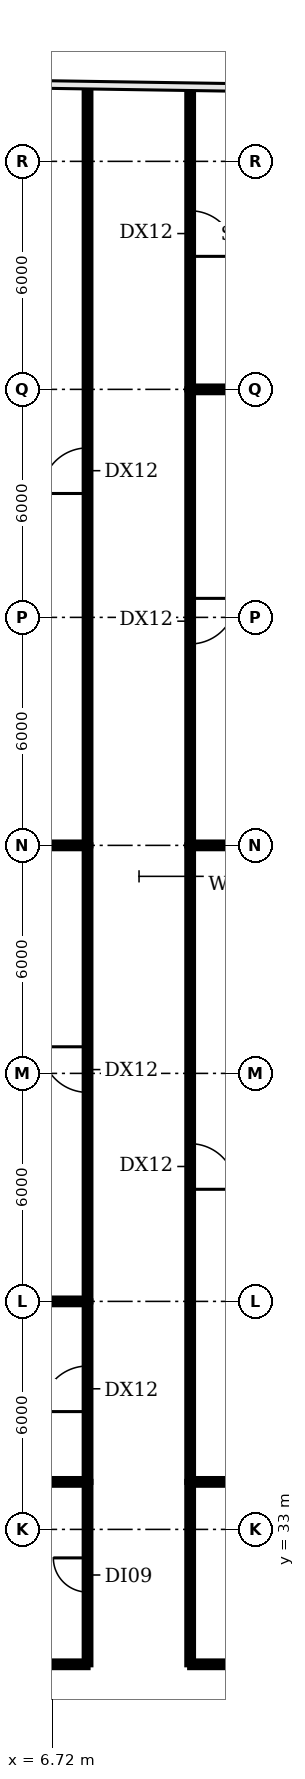
"""IFC4 building model, lengths in metres.
Left out: names, types, materials, properties, quantities, classifications, styles, units other than length and angle.
Written with IfcOpenShell. Run it as: python <this file> out.ifc"""

import sys

from ifc_helpers import new_model, si_unit, direction, frame, frame_2d, origin, place, context, subcontext, project, spatial, rectangle, extrude, element, fill, save


model = new_model("IFC4")
c1 = context("Model", 3, precision=1e-05, world=origin(), true_north=direction((0.0, 1.0)))
c2 = subcontext(c1, "Body", "Model", "MODEL_VIEW")
j1 = project(units=[si_unit("LENGTHUNIT", "METRE"), si_unit("PLANEANGLEUNIT", "RADIAN")], contexts=[c1])
p1 = place(None, origin())
s1 = spatial("IfcSite", under=j1, at=p1, CompositionType="ELEMENT")
p2 = place(p1, origin())
s2 = spatial("IfcBuilding", under=s1, at=p2, CompositionType="ELEMENT")
p3 = place(p2, frame((0.0, 0.0, 134.0)))
s3 = spatial("IfcBuildingStorey", under=s2, at=p3, CompositionType="ELEMENT", Elevation=134.0)
p4 = place(p3, frame((-0.981, 34.25, 0.0), z_axis=(0.0, 0.0, 1.0), x_axis=(1.0, 0.0, 0.0)))
e1 = element("IfcWall", 1, at=p4, inside=s3, PredefinedType="PARTITIONING", context=c2, shape_type="SweptSolid", body=[
    extrude(rectangle(XDim=8.631, YDim=0.15, at=frame_2d((4.315, 0.0))), origin(), (0.0, 0.0, 1.0), 2.78),
])
for number, where, z_axis, x_axis in (
    (2, (-1.04, 39.0, 0.0), (0.0, 0.0, 1.0), (1.0, 0.0, 0.0)),
    (3, (-1.04, 51.0, 0.0), (0.0, 0.0, 1.0), (1.0, 0.0, 0.0)),
):
    element("IfcWall", number, at=place(p3, frame(where, z_axis=z_axis, x_axis=x_axis)), inside=s3, PredefinedType="PARTITIONING", context=c2, shape_type="SweptSolid", body=[
        extrude(rectangle(XDim=8.69, YDim=0.15, at=frame_2d((4.345, 0.0))), origin(), (0.0, 0.0, 1.0), 2.78),
    ])
p5 = place(p3, frame((2.55, 29.45, 0.0), z_axis=(0.0, 0.0, 1.0), x_axis=(1.0, 0.0, 0.0)))
e4 = element("IfcWall", 4, at=p5, inside=s3, PredefinedType="PARTITIONING", context=c2, shape_type="SweptSolid", body=[
    extrude(rectangle(XDim=5.1, YDim=0.15, at=frame_2d((2.55, 0.0))), origin(), (0.0, 0.0, 1.0), 2.78),
])
p6 = place(p3, frame((7.65, 29.45, 0.0), z_axis=(0.0, 0.0, 1.0), x_axis=(0.0, 1.0, 0.0)))
e5 = element("IfcWall", 5, at=p6, inside=s3, PredefinedType="PARTITIONING", context=c2, shape_type="SweptSolid", body=[
    extrude(rectangle(XDim=4.8, YDim=0.15, at=frame_2d((2.4, 0.0))), origin(), (0.0, 0.0, 1.0), 2.78),
])
p7 = place(p6, frame((1.9, 0.0, 0.0)))
e6 = element("IfcOpeningElement", 6, at=p7, cuts=e5, PredefinedType="OPENING", context=c2, shape_type="SweptSolid", body=[
    extrude(rectangle(XDim=0.9, YDim=2.1, at=frame_2d((0.45, 1.05))), frame((0.0, 0.085, 0.0), z_axis=(0.0, -1.0, 0.0), x_axis=(1.0, 0.0, 0.0)), (0.0, 0.0, 1.0), 0.17),
])
p8 = place(p3, frame((7.65, 34.25, 0.0), z_axis=(0.0, 0.0, 1.0), x_axis=(0.0, 1.0, 0.0)))
e7 = element("IfcWall", 7, at=p8, inside=s3, PredefinedType="PARTITIONING", context=c2, shape_type="SweptSolid", body=[
    extrude(rectangle(XDim=4.75, YDim=0.15, at=frame_2d((2.375, 0.0))), origin(), (0.0, 0.0, 1.0), 2.78),
])
p9 = place(p8, frame((1.85, 0.0, 0.0)))
e8 = element("IfcOpeningElement", 8, at=p9, cuts=e7, PredefinedType="OPENING", context=c2, shape_type="SweptSolid", body=[
    extrude(rectangle(XDim=1.2, YDim=2.1, at=frame_2d((0.6, 1.05))), frame((0.0, 0.085, 0.0), z_axis=(0.0, -1.0, 0.0), x_axis=(1.0, 0.0, 0.0)), (0.0, 0.0, 1.0), 0.17),
])
p10 = place(p3, frame((7.65, 39.0, 0.0), z_axis=(0.0, 0.0, 1.0), x_axis=(0.0, 1.0, 0.0)))
e9 = element("IfcWall", 9, at=p10, inside=s3, PredefinedType="PARTITIONING", context=c2, shape_type="SweptSolid", body=[
    extrude(rectangle(XDim=12.0, YDim=0.15, at=frame_2d((6.0, 0.0))), origin(), (0.0, 0.0, 1.0), 2.78),
])
p11 = place(p10, frame((5.5, 0.0, 0.0)))
e10 = element("IfcOpeningElement", 10, at=p11, cuts=e9, PredefinedType="OPENING", context=c2, shape_type="SweptSolid", body=[
    extrude(rectangle(XDim=1.2, YDim=2.1, at=frame_2d((0.6, 1.05))), frame((0.0, 0.085, 0.0), z_axis=(0.0, -1.0, 0.0), x_axis=(1.0, 0.0, 0.0)), (0.0, 0.0, 1.0), 0.17),
])
p12 = place(p3, frame((7.65, 51.0, 0.0), z_axis=(0.0, 0.0, 1.0), x_axis=(0.0, 1.0, 0.0)))
e11 = element("IfcWall", 11, at=p12, inside=s3, PredefinedType="PARTITIONING", context=c2, shape_type="SweptSolid", body=[
    extrude(rectangle(XDim=19.96, YDim=0.15, at=frame_2d((9.98, 0.0))), origin(), (0.0, 0.0, 1.0), 2.78),
])
p13 = place(p12, frame((9.26, 0.0, 0.0)))
e12 = element("IfcOpeningElement", 12, at=p13, cuts=e11, PredefinedType="OPENING", context=c2, shape_type="SweptSolid", body=[
    extrude(rectangle(XDim=1.2, YDim=2.1, at=frame_2d((0.6, 1.05))), frame((0.0, 0.085, 0.0), z_axis=(0.0, -1.0, 0.0), x_axis=(1.0, 0.0, 0.0)), (0.0, 0.0, 1.0), 0.17),
])
p14 = place(p3, frame((10.35, 29.45, 0.0), z_axis=(0.0, 0.0, 1.0), x_axis=(0.0, 1.0, 0.0)))
e13 = element("IfcWall", 13, at=p14, inside=s3, PredefinedType="PARTITIONING", context=c2, shape_type="SweptSolid", body=[
    extrude(rectangle(XDim=4.8, YDim=0.15, at=frame_2d((2.4, 0.0))), origin(), (0.0, 0.0, 1.0), 2.78),
])
p15 = place(p3, frame((10.35, 29.45, 0.0), z_axis=(0.0, 0.0, 1.0), x_axis=(1.0, 0.0, 0.0)))
e14 = element("IfcWall", 14, at=p15, inside=s3, PredefinedType="PARTITIONING", context=c2, shape_type="SweptSolid", body=[
    extrude(rectangle(XDim=4.05, YDim=0.15, at=frame_2d((2.025, 0.0))), origin(), (0.0, 0.0, 1.0), 2.78),
])
p16 = place(p3, frame((10.35, 34.25, 0.0), z_axis=(0.0, 0.0, 1.0), x_axis=(1.0, 0.0, 0.0)))
e15 = element("IfcWall", 15, at=p16, inside=s3, PredefinedType="PARTITIONING", context=c2, shape_type="SweptSolid", body=[
    extrude(rectangle(XDim=14.756, YDim=0.15, at=frame_2d((7.378, 0.0))), origin(), (0.0, 0.0, 1.0), 2.78),
])
p17 = place(p3, frame((10.35, 51.0, 0.0), z_axis=(0.0, 0.0, 1.0), x_axis=(0.0, -1.0, 0.0)))
e16 = element("IfcWall", 16, at=p17, inside=s3, PredefinedType="PARTITIONING", context=c2, shape_type="SweptSolid", body=[
    extrude(rectangle(XDim=16.75, YDim=0.15, at=frame_2d((8.375, 0.0))), origin(), (0.0, 0.0, 1.0), 2.78),
])
p18 = place(p17, frame((7.85, 0.0, 0.0)))
e17 = element("IfcOpeningElement", 17, at=p18, cuts=e16, PredefinedType="OPENING", context=c2, shape_type="SweptSolid", body=[
    extrude(rectangle(XDim=1.2, YDim=2.1, at=frame_2d((0.6, 1.05))), frame((0.0, 0.085, 0.0), z_axis=(0.0, -1.0, 0.0), x_axis=(1.0, 0.0, 0.0)), (0.0, 0.0, 1.0), 0.17),
])
p19 = place(p3, frame((10.35, 51.0, 0.0), z_axis=(0.0, 0.0, 1.0), x_axis=(1.0, 0.0, 0.0)))
e18 = element("IfcWall", 18, at=p19, inside=s3, PredefinedType="PARTITIONING", context=c2, shape_type="SweptSolid", body=[
    extrude(rectangle(XDim=16.41, YDim=0.15, at=frame_2d((8.205, 0.0))), origin(), (0.0, 0.0, 1.0), 2.78),
])
p20 = place(p3, frame((10.35, 63.0, 0.0), z_axis=(0.0, 0.0, 1.0), x_axis=(0.0, -1.0, 0.0)))
e19 = element("IfcWall", 19, at=p20, inside=s3, PredefinedType="PARTITIONING", context=c2, shape_type="SweptSolid", body=[
    extrude(rectangle(XDim=12.0, YDim=0.15, at=frame_2d((6.0, 0.0))), origin(), (0.0, 0.0, 1.0), 2.78),
])
p21 = place(p20, frame((5.5, 0.0, 0.0)))
e20 = element("IfcOpeningElement", 20, at=p21, cuts=e19, PredefinedType="OPENING", context=c2, shape_type="SweptSolid", body=[
    extrude(rectangle(XDim=1.2, YDim=2.1, at=frame_2d((0.6, 1.05))), frame((0.0, 0.085, 0.0), z_axis=(0.0, -1.0, 0.0), x_axis=(1.0, 0.0, 0.0)), (0.0, 0.0, 1.0), 0.17),
])
p22 = place(p3, frame((10.35, 63.0, 0.0), z_axis=(0.0, 0.0, 1.0), x_axis=(1.0, 0.0, 0.0)))
e21 = element("IfcWall", 21, at=p22, inside=s3, PredefinedType="PARTITIONING", context=c2, shape_type="SweptSolid", body=[
    extrude(rectangle(XDim=17.1, YDim=0.15, at=frame_2d((8.55, 0.0))), origin(), (0.0, 0.0, 1.0), 2.78),
])
p23 = place(p3, frame((10.35, 70.91, 0.0), z_axis=(0.0, 0.0, 1.0), x_axis=(0.0, -1.0, 0.0)))
e22 = element("IfcWall", 22, at=p23, inside=s3, PredefinedType="PARTITIONING", context=c2, shape_type="SweptSolid", body=[
    extrude(rectangle(XDim=7.91, YDim=0.15, at=frame_2d((3.955, 0.0))), origin(), (0.0, 0.0, 1.0), 2.78),
])
p24 = place(p23, frame((3.21, 0.0, 0.0)))
e23 = element("IfcOpeningElement", 23, at=p24, cuts=e22, PredefinedType="OPENING", context=c2, shape_type="SweptSolid", body=[
    extrude(rectangle(XDim=1.2, YDim=2.1, at=frame_2d((0.6, 1.05))), frame((0.0, 0.085, 0.0), z_axis=(0.0, -1.0, 0.0), x_axis=(1.0, 0.0, 0.0)), (0.0, 0.0, 1.0), 0.17),
])
p25 = place(p7, origin())
e24 = element("IfcDoor", 24, at=p25, inside=s3, OperationType="SINGLE_SWING_RIGHT", PredefinedType="DOOR", context=c2, shape_type="SweptSolid", body=[
    extrude(rectangle(XDim=0.9, YDim=2.1, at=frame_2d((0.45, 1.05))), frame((0.0, 0.025, 0.0), z_axis=(0.0, -1.0, 0.0), x_axis=(1.0, 0.0, 0.0)), (0.0, 0.0, 1.0), 0.05),
])
fill(e6, e24)
p26 = place(p9, origin())
e25 = element("IfcDoor", 25, at=p26, inside=s3, OperationType="SINGLE_SWING_LEFT", PredefinedType="DOOR", context=c2, shape_type="SweptSolid", body=[
    extrude(rectangle(XDim=1.2, YDim=2.1, at=frame_2d((0.6, 1.05))), frame((0.0, 0.025, 0.0), z_axis=(0.0, -1.0, 0.0), x_axis=(1.0, 0.0, 0.0)), (0.0, 0.0, 1.0), 0.05),
])
fill(e8, e25)
p27 = place(p11, origin())
e26 = element("IfcDoor", 26, at=p27, inside=s3, OperationType="SINGLE_SWING_RIGHT", PredefinedType="DOOR", context=c2, shape_type="SweptSolid", body=[
    extrude(rectangle(XDim=1.2, YDim=2.1, at=frame_2d((0.6, 1.05))), frame((0.0, 0.025, 0.0), z_axis=(0.0, -1.0, 0.0), x_axis=(1.0, 0.0, 0.0)), (0.0, 0.0, 1.0), 0.05),
])
fill(e10, e26)
p28 = place(p13, origin())
e27 = element("IfcDoor", 27, at=p28, inside=s3, OperationType="SINGLE_SWING_LEFT", PredefinedType="DOOR", context=c2, shape_type="SweptSolid", body=[
    extrude(rectangle(XDim=1.2, YDim=2.1, at=frame_2d((0.6, 1.05))), frame((0.0, 0.025, 0.0), z_axis=(0.0, -1.0, 0.0), x_axis=(1.0, 0.0, 0.0)), (0.0, 0.0, 1.0), 0.05),
])
fill(e12, e27)
p29 = place(p18, origin())
e28 = element("IfcDoor", 28, at=p29, inside=s3, OperationType="SINGLE_SWING_RIGHT", PredefinedType="DOOR", context=c2, shape_type="SweptSolid", body=[
    extrude(rectangle(XDim=1.2, YDim=2.1, at=frame_2d((0.6, 1.05))), frame((0.0, 0.025, 0.0), z_axis=(0.0, -1.0, 0.0), x_axis=(1.0, 0.0, 0.0)), (0.0, 0.0, 1.0), 0.05),
])
fill(e17, e28)
p30 = place(p21, origin())
e29 = element("IfcDoor", 29, at=p30, inside=s3, OperationType="SINGLE_SWING_LEFT", PredefinedType="DOOR", context=c2, shape_type="SweptSolid", body=[
    extrude(rectangle(XDim=1.2, YDim=2.1, at=frame_2d((0.6, 1.05))), frame((0.0, 0.025, 0.0), z_axis=(0.0, -1.0, 0.0), x_axis=(1.0, 0.0, 0.0)), (0.0, 0.0, 1.0), 0.05),
])
fill(e20, e29)
p31 = place(p24, origin())
e30 = element("IfcDoor", 30, at=p31, inside=s3, OperationType="SINGLE_SWING_RIGHT", PredefinedType="DOOR", context=c2, shape_type="SweptSolid", body=[
    extrude(rectangle(XDim=1.2, YDim=2.1, at=frame_2d((0.6, 1.05))), frame((0.0, 0.025, 0.0), z_axis=(0.0, -1.0, 0.0), x_axis=(1.0, 0.0, 0.0)), (0.0, 0.0, 1.0), 0.05),
])
fill(e23, e30)
save(model, sys.argv[1])
